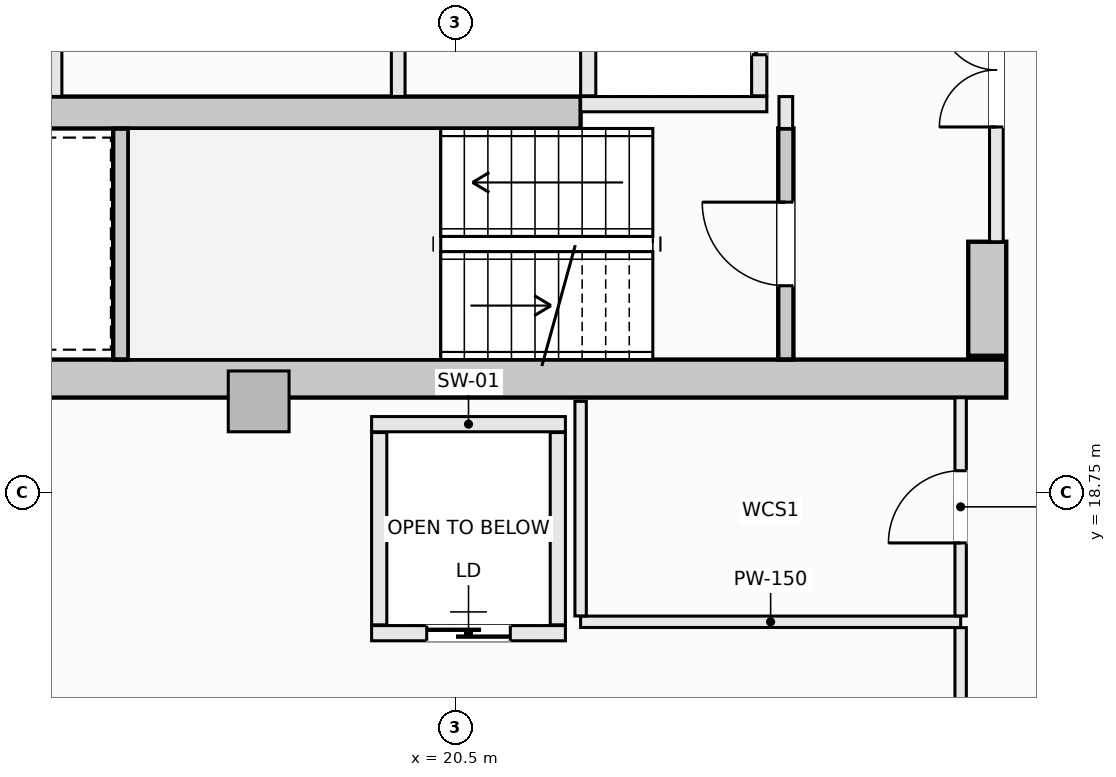
"""IFC4 building model, lengths in metres.
Left out: names, types, materials, properties, quantities, classifications, styles, units other than length and angle.
Written with IfcOpenShell. Run it as: python <this file> out.ifc"""

import sys

from ifc_helpers import new_model, si_unit, direction, frame, frame_2d, origin, origin_2d, place, context, subcontext, project, spatial, rectangle, extrude, element, fill, save


model = new_model("IFC4")
c1 = context("Model", 3, precision=1e-05, world=origin(), true_north=direction((0.0, 1.0)))
c2 = subcontext(c1, "Body", "Model", "MODEL_VIEW")
j1 = project(units=[si_unit("LENGTHUNIT", "METRE"), si_unit("PLANEANGLEUNIT", "RADIAN")], contexts=[c1])
p1 = place(None, origin())
s1 = spatial("IfcSite", under=j1, at=p1, CompositionType="ELEMENT")
p2 = place(p1, origin())
s2 = spatial("IfcBuilding", under=s1, at=p2, CompositionType="ELEMENT")
p3 = place(p2, frame((0.0, 0.0, 212.9)))
s3 = spatial("IfcBuildingStorey", under=s2, at=p3, CompositionType="ELEMENT", Elevation=212.9)
p4 = place(p3, frame((14.25, 20.25, -0.27), z_axis=(0.0, 0.0, 1.0), x_axis=(1.0, 0.0, 0.0)))
e1 = element("IfcWall", 1, at=p4, inside=s3, PredefinedType="SHEAR", context=c2, shape_type="SweptSolid", body=[
    extrude(rectangle(XDim=13.5, YDim=0.5, at=frame_2d((6.75, 0.0))), origin(), (0.0, 0.0, 1.0), 3.3),
])
p5 = place(p3, frame((27.5, 20.55, -0.27), z_axis=(0.0, 0.0, 1.0), x_axis=(0.0, 1.0, 0.0)))
e2 = element("IfcWall", 2, at=p5, inside=s3, PredefinedType="SHEAR", context=c2, shape_type="SweptSolid", body=[
    extrude(rectangle(XDim=1.5, YDim=0.5, at=frame_2d((0.75, 0.0))), origin(), (0.0, 0.0, 1.0), 3.3),
])
p6 = place(p3, frame((14.85, 23.75, -0.27), z_axis=(0.0, 0.0, 1.0), x_axis=(1.0, 0.0, 0.0)))
e3 = element("IfcWall", 3, at=p6, inside=s3, PredefinedType="SHEAR", context=c2, shape_type="SweptSolid", body=[
    extrude(rectangle(XDim=7.3, YDim=0.42, at=frame_2d((3.65, 0.0))), origin(), (0.0, 0.0, 1.0), 3.3),
])
p7 = place(p3, frame((17.914, 19.95, -0.27), z_axis=(0.0, 0.0, 1.0), x_axis=(1.0, 0.0, 0.0)))
e4 = element("IfcColumn", 4, at=p7, inside=s3, PredefinedType="PILASTER", context=c2, shape_type="SweptSolid", body=[
    extrude(rectangle(XDim=0.8, YDim=0.8, at=origin_2d()), origin(), (0.0, 0.0, 1.0), 3.3),
])
p8 = place(p3, frame((24.85, 20.502, -0.27), z_axis=(0.0, 0.0, 1.0), x_axis=(0.0, 1.0, 0.0)))
e5 = element("IfcWall", 5, at=p8, inside=s3, PredefinedType="SHEAR", context=c2, shape_type="SweptSolid", body=[
    extrude(rectangle(XDim=3.038, YDim=0.2, at=frame_2d((1.519, 0.0))), origin(), (0.0, 0.0, 1.0), 3.3),
])
p9 = place(p8, frame((0.969, 0.0, 0.27)))
e6 = element("IfcOpeningElement", 6, at=p9, cuts=e5, PredefinedType="OPENING", context=c2, shape_type="SweptSolid", body=[
    extrude(rectangle(XDim=1.1, YDim=2.15, at=frame_2d((0.55, 1.075))), frame((0.0, 0.11, 0.0), z_axis=(0.0, -1.0, 0.0), x_axis=(1.0, 0.0, 0.0)), (0.0, 0.0, 1.0), 0.22),
])
p10 = place(p3, frame((16.1, 20.502, -0.27), z_axis=(0.0, 0.0, 1.0), x_axis=(0.0, 1.0, 0.0)))
e7 = element("IfcWall", 7, at=p10, inside=s3, PredefinedType="SHEAR", context=c2, shape_type="SweptSolid", body=[
    extrude(rectangle(XDim=3.036, YDim=0.2, at=frame_2d((1.518, 0.0))), origin(), (0.0, 0.0, 1.0), 3.3),
])
p11 = place(p3, frame((22.15, 23.86, 0.0), z_axis=(0.0, 0.0, 1.0), x_axis=(1.0, 0.0, 0.0)))
e8 = element("IfcWall", 8, at=p11, inside=s3, PredefinedType="SOLIDWALL", context=c2, shape_type="SweptSolid", body=[
    extrude(rectangle(XDim=2.45, YDim=0.2, at=frame_2d((1.225, 0.0))), origin(), (0.0, 0.0, 1.0), 3.03),
])
p12 = place(p3, frame((22.25, 23.97, 0.0), z_axis=(0.0, 0.0, 1.0), x_axis=(0.0, 1.0, 0.0)))
e9 = element("IfcWall", 9, at=p12, inside=s3, PredefinedType="SOLIDWALL", context=c2, shape_type="SweptSolid", body=[
    extrude(rectangle(XDim=2.18, YDim=0.2, at=frame_2d((1.09, 0.0))), origin(), (0.0, 0.0, 1.0), 3.03),
])
p13 = place(p3, frame((24.5, 23.97, 0.0), z_axis=(0.0, 0.0, 1.0), x_axis=(0.0, 1.0, 0.0)))
e10 = element("IfcWall", 10, at=p13, inside=s3, PredefinedType="SOLIDWALL", context=c2, shape_type="SweptSolid", body=[
    extrude(rectangle(XDim=2.18, YDim=0.2, at=frame_2d((1.09, 0.0))), origin(), (0.0, 0.0, 1.0), 3.03),
])
p14 = place(p13, frame((0.54, 0.0, 0.0)))
e11 = element("IfcOpeningElement", 11, at=p14, cuts=e10, PredefinedType="OPENING", context=c2, shape_type="SweptSolid", body=[
    extrude(rectangle(XDim=1.1, YDim=2.2, at=frame_2d((0.55, 1.1))), frame((0.0, 0.11, 0.0), z_axis=(0.0, -1.0, 0.0), x_axis=(1.0, 0.0, 0.0)), (0.0, 0.0, 1.0), 0.22),
])
p15 = place(p3, frame((19.4, 19.65, 0.0), z_axis=(0.0, 0.0, 1.0), x_axis=(1.0, 0.0, 0.0)))
e12 = element("IfcWall", 12, at=p15, inside=s3, PredefinedType="SOLIDWALL", context=c2, shape_type="SweptSolid", body=[
    extrude(rectangle(XDim=2.55, YDim=0.2, at=frame_2d((1.275, 0.0))), origin(), (0.0, 0.0, 1.0), 3.03),
])
p16 = place(p3, frame((19.4, 16.9, 0.0), z_axis=(0.0, 0.0, 1.0), x_axis=(1.0, 0.0, 0.0)))
e13 = element("IfcWall", 13, at=p16, inside=s3, PredefinedType="SOLIDWALL", context=c2, shape_type="SweptSolid", body=[
    extrude(rectangle(XDim=2.55, YDim=0.2, at=frame_2d((1.275, 0.0))), origin(), (0.0, 0.0, 1.0), 3.03),
])
p17 = place(p16, frame((0.725, 0.0, 0.0)))
e14 = element("IfcOpeningElement", 14, at=p17, cuts=e13, PredefinedType="OPENING", context=c2, shape_type="SweptSolid", body=[
    extrude(rectangle(XDim=1.1, YDim=2.2, at=frame_2d((0.55, 1.1))), frame((0.0, 0.11, 0.0), z_axis=(0.0, -1.0, 0.0), x_axis=(1.0, 0.0, 0.0)), (0.0, 0.0, 1.0), 0.22),
])
for number, where, z_axis, x_axis in (
    (15, (19.5, 17.01, 0.0), (0.0, 0.0, 1.0), (0.0, 1.0, 0.0)),
    (16, (21.85, 17.01, 0.0), (0.0, 0.0, 1.0), (0.0, 1.0, 0.0)),
):
    element("IfcWall", number, at=place(p3, frame(where, z_axis=z_axis, x_axis=x_axis)), inside=s3, PredefinedType="SOLIDWALL", context=c2, shape_type="SweptSolid", body=[
        extrude(rectangle(XDim=2.53, YDim=0.2, at=frame_2d((1.265, 0.0))), origin(), (0.0, 0.0, 1.0), 3.03),
    ])
p18 = place(p3, frame((24.85, 23.54, 0.0), z_axis=(0.0, 0.0, 1.0), x_axis=(0.0, 1.0, 0.0)))
e17 = element("IfcWall", 17, at=p18, inside=s3, PredefinedType="SOLIDWALL", context=c2, shape_type="SweptSolid", body=[
    extrude(rectangle(XDim=0.42, YDim=0.18, at=frame_2d((0.21, 0.0))), origin(), (0.0, 0.0, 1.0), 3.03),
])
p19 = place(p3, frame((27.62, 22.05, 0.0), z_axis=(0.0, 0.0, 1.0), x_axis=(0.0, 1.0, 0.0)))
e18 = element("IfcWall", 18, at=p19, inside=s3, PredefinedType="SOLIDWALL", context=c2, shape_type="SweptSolid", body=[
    extrude(rectangle(XDim=9.9, YDim=0.18, at=frame_2d((4.95, 0.0))), origin(), (0.0, 0.0, 1.0), 3.03),
])
p20 = place(p19, frame((4.475, 0.0, 0.0)))
e19 = element("IfcOpeningElement", 19, at=p20, cuts=e18, PredefinedType="OPENING", context=c2, shape_type="SweptSolid", body=[
    extrude(rectangle(XDim=0.95, YDim=2.1, at=frame_2d((0.475, 1.05))), frame((0.0, 0.1, 0.0), z_axis=(0.0, -1.0, 0.0), x_axis=(1.0, 0.0, 0.0)), (0.0, 0.0, 1.0), 0.2),
])
p21 = place(p19, frame((6.89, 0.0, 0.0)))
e20 = element("IfcOpeningElement", 20, at=p21, cuts=e18, PredefinedType="OPENING", context=c2, shape_type="SweptSolid", body=[
    extrude(rectangle(XDim=1.5, YDim=2.2, at=frame_2d((0.75, 1.1))), frame((0.0, 0.1, 0.0), z_axis=(0.0, -1.0, 0.0), x_axis=(1.0, 0.0, 0.0)), (0.0, 0.0, 1.0), 0.2),
])
p22 = place(p19, frame((1.51, 0.0, 0.0)))
e21 = element("IfcOpeningElement", 21, at=p22, cuts=e18, PredefinedType="OPENING", context=c2, shape_type="SweptSolid", body=[
    extrude(rectangle(XDim=1.5, YDim=2.2, at=frame_2d((0.75, 1.1))), frame((0.0, 0.1, 0.0), z_axis=(0.0, -1.0, 0.0), x_axis=(1.0, 0.0, 0.0)), (0.0, 0.0, 1.0), 0.2),
])
p23 = place(p3, frame((15.25, 23.962, 0.0), z_axis=(0.0, 0.0, 1.0), x_axis=(0.0, 1.0, 0.0)))
e22 = element("IfcWall", 22, at=p23, inside=s3, PredefinedType="PARTITIONING", context=c2, shape_type="SweptSolid", body=[
    extrude(rectangle(XDim=2.106, YDim=0.15, at=frame_2d((1.053, 0.0))), origin(), (0.0, 0.0, 1.0), 3.03),
])
p24 = place(p3, frame((19.75, 23.962, 0.0), z_axis=(0.0, 0.0, 1.0), x_axis=(0.0, 1.0, 0.0)))
e23 = element("IfcWall", 23, at=p24, inside=s3, PredefinedType="SOLIDWALL", context=c2, shape_type="SweptSolid", body=[
    extrude(rectangle(XDim=2.106, YDim=0.18, at=frame_2d((1.053, 0.0))), origin(), (0.0, 0.0, 1.0), 3.03),
])
p25 = place(p3, frame((22.15, 17.05, 0.0), z_axis=(0.0, 0.0, 1.0), x_axis=(1.0, 0.0, 0.0)))
e24 = element("IfcWall", 24, at=p25, inside=s3, PredefinedType="PARTITIONING", context=c2, shape_type="SweptSolid", body=[
    extrude(rectangle(XDim=5.0, YDim=0.15, at=frame_2d((2.5, 0.0))), origin(), (0.0, 0.0, 1.0), 3.03),
])
p26 = place(p3, frame((22.15, 17.127, 0.0), z_axis=(0.0, 0.0, 1.0), x_axis=(0.0, 1.0, 0.0)))
e25 = element("IfcWall", 25, at=p26, inside=s3, PredefinedType="PARTITIONING", context=c2, shape_type="SweptSolid", body=[
    extrude(rectangle(XDim=2.823, YDim=0.15, at=frame_2d((1.412, 0.0))), origin(), (0.0, 0.0, 1.0), 3.03),
])
p27 = place(p3, frame((27.15, 11.113, 0.0), z_axis=(0.0, 0.0, 1.0), x_axis=(0.0, 1.0, 0.0)))
e26 = element("IfcWall", 26, at=p27, inside=s3, PredefinedType="PARTITIONING", context=c2, shape_type="SweptSolid", body=[
    extrude(rectangle(XDim=5.86, YDim=0.15, at=frame_2d((2.93, 0.0))), origin(), (0.0, 0.0, 1.0), 3.03),
])
p28 = place(p27, frame((3.359, 0.0, 0.0)))
e27 = element("IfcOpeningElement", 27, at=p28, cuts=e26, PredefinedType="OPENING", context=c2, shape_type="SweptSolid", body=[
    extrude(rectangle(XDim=0.95, YDim=2.1, at=frame_2d((0.475, 1.05))), frame((0.0, 0.085, 0.0), z_axis=(0.0, -1.0, 0.0), x_axis=(1.0, 0.0, 0.0)), (0.0, 0.0, 1.0), 0.17),
])
p29 = place(p3, frame((27.15, 17.127, 0.0), z_axis=(0.0, 0.0, 1.0), x_axis=(0.0, 1.0, 0.0)))
e28 = element("IfcWall", 28, at=p29, inside=s3, PredefinedType="PARTITIONING", context=c2, shape_type="SweptSolid", body=[
    extrude(rectangle(XDim=2.871, YDim=0.15, at=frame_2d((1.436, 0.0))), origin(), (0.0, 0.0, 1.0), 3.03),
])
p30 = place(p29, frame((0.96, 0.0, 0.0)))
e29 = element("IfcOpeningElement", 29, at=p30, cuts=e28, PredefinedType="OPENING", context=c2, shape_type="SweptSolid", body=[
    extrude(rectangle(XDim=0.95, YDim=2.1, at=frame_2d((0.475, 1.05))), frame((0.0, 0.085, 0.0), z_axis=(0.0, -1.0, 0.0), x_axis=(1.0, 0.0, 0.0)), (0.0, 0.0, 1.0), 0.17),
])
p31 = place(p9, origin())
e30 = element("IfcDoor", 30, at=p31, inside=s3, OperationType="SINGLE_SWING_RIGHT", PredefinedType="DOOR", context=c2, shape_type="SweptSolid", body=[
    extrude(rectangle(XDim=1.1, YDim=2.15, at=frame_2d((0.55, 1.075))), frame((0.0, 0.025, 0.0), z_axis=(0.0, -1.0, 0.0), x_axis=(1.0, 0.0, 0.0)), (0.0, 0.0, 1.0), 0.05),
])
fill(e6, e30)
p32 = place(p14, origin())
e31 = element("IfcDoor", 31, at=p32, inside=s3, OperationType="SLIDING_TO_LEFT", PredefinedType="DOOR", context=c2, shape_type="SweptSolid", body=[
    extrude(rectangle(XDim=1.1, YDim=2.2, at=frame_2d((0.55, 1.1))), frame((0.0, 0.025, 0.0), z_axis=(0.0, -1.0, 0.0), x_axis=(1.0, 0.0, 0.0)), (0.0, 0.0, 1.0), 0.05),
])
fill(e11, e31)
p33 = place(p17, origin())
e32 = element("IfcDoor", 32, at=p33, inside=s3, OperationType="SLIDING_TO_LEFT", PredefinedType="DOOR", context=c2, shape_type="SweptSolid", body=[
    extrude(rectangle(XDim=1.1, YDim=2.2, at=frame_2d((0.55, 1.1))), frame((0.0, 0.025, 0.0), z_axis=(0.0, -1.0, 0.0), x_axis=(1.0, 0.0, 0.0)), (0.0, 0.0, 1.0), 0.05),
])
fill(e14, e32)
p34 = place(p22, origin())
e33 = element("IfcDoor", 33, at=p34, inside=s3, OperationType="DOUBLE_DOOR_SINGLE_SWING", PredefinedType="DOOR", context=c2, shape_type="SweptSolid", body=[
    extrude(rectangle(XDim=1.5, YDim=2.2, at=frame_2d((0.75, 1.1))), frame((0.0, 0.025, 0.0), z_axis=(0.0, -1.0, 0.0), x_axis=(1.0, 0.0, 0.0)), (0.0, 0.0, 1.0), 0.05),
])
fill(e21, e33)
p35 = place(p30, origin())
e34 = element("IfcDoor", 34, at=p35, inside=s3, OperationType="SINGLE_SWING_LEFT", PredefinedType="DOOR", context=c2, shape_type="SweptSolid", body=[
    extrude(rectangle(XDim=0.95, YDim=2.1, at=frame_2d((0.475, 1.05))), frame((0.0, 0.025, 0.0), z_axis=(0.0, -1.0, 0.0), x_axis=(1.0, 0.0, 0.0)), (0.0, 0.0, 1.0), 0.05),
])
fill(e29, e34)
save(model, sys.argv[1])
